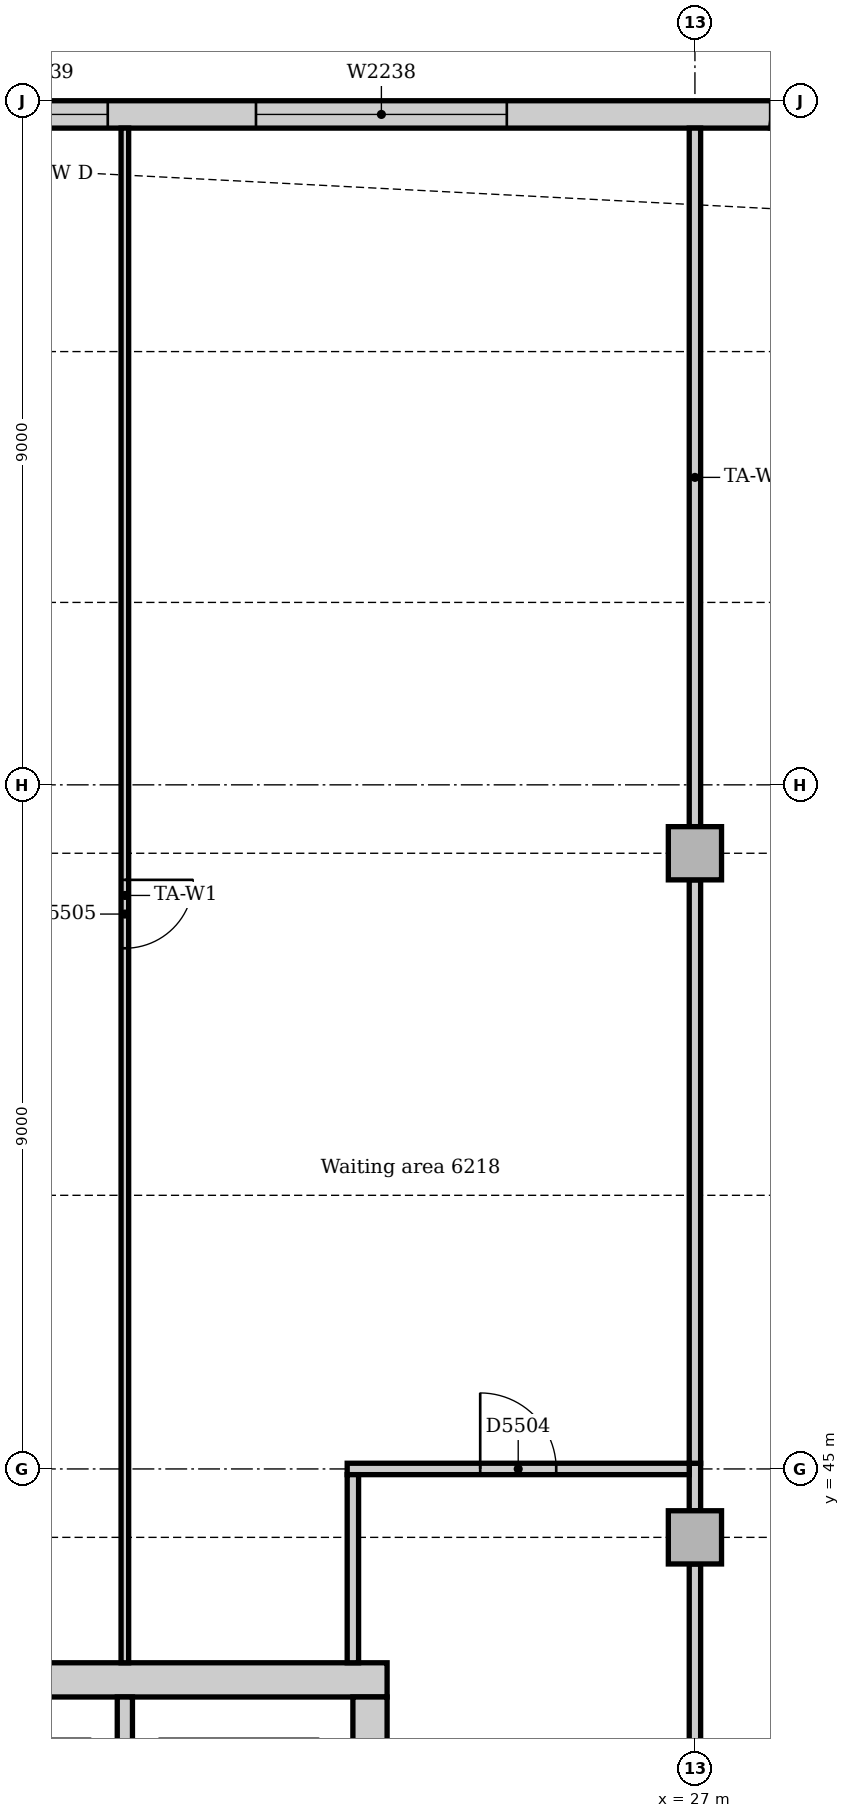
"""IFC4 building model, lengths in metres.
Left out: names, types, materials, properties, quantities, classifications, styles, units other than length and angle.
Written with IfcOpenShell. Run it as: python <this file> out.ifc"""

import sys

from ifc_helpers import new_model, si_unit, direction, frame, frame_2d, origin, origin_2d, place, context, subcontext, project, spatial, rectangle, extrude, element, fill, save


model = new_model("IFC4")
c1 = context("Model", 3, precision=1e-05, world=origin(), true_north=direction((0.0, 1.0)))
c2 = subcontext(c1, "Body", "Model", "MODEL_VIEW")
j1 = project(units=[si_unit("LENGTHUNIT", "METRE"), si_unit("PLANEANGLEUNIT", "RADIAN")], contexts=[c1])
p1 = place(None, origin())
s1 = spatial("IfcSite", under=j1, at=p1, CompositionType="ELEMENT")
p2 = place(p1, origin())
s2 = spatial("IfcBuilding", under=s1, at=p2, CompositionType="ELEMENT")
p3 = place(p2, frame((0.0, 0.0, 259.0)))
s3 = spatial("IfcBuildingStorey", under=s2, at=p3, CompositionType="ELEMENT", Elevation=259.0)
p4 = place(p3, frame((22.95, 42.225, 0.0), z_axis=(0.0, 0.0, 1.0), x_axis=(-1.0, 0.0, 0.0)))
e1 = element("IfcWall", 1, at=p4, inside=s3, PredefinedType="SOLIDWALL", context=c2, shape_type="SweptSolid", body=[
    extrude(rectangle(XDim=18.9, YDim=0.45, at=frame_2d((9.45, 0.0))), origin(), (0.0, 0.0, 1.0), 4.0),
])
p5 = place(p3, frame((22.725, 31.5, 0.0), z_axis=(0.0, 0.0, 1.0), x_axis=(0.0, 1.0, 0.0)))
e2 = element("IfcWall", 2, at=p5, inside=s3, PredefinedType="SOLIDWALL", context=c2, shape_type="SweptSolid", body=[
    extrude(rectangle(XDim=10.5, YDim=0.45, at=frame_2d((5.25, 0.0))), origin(), (0.0, 0.0, 1.0), 4.0),
])
p6 = place(p5, frame((3.15, 0.0, 0.0)))
e3 = element("IfcOpeningElement", 3, at=p6, cuts=e2, PredefinedType="OPENING", context=c2, shape_type="SweptSolid", body=[
    extrude(rectangle(XDim=1.0, YDim=2.1, at=frame_2d((0.5, 1.05))), frame((0.0, 0.235, 0.0), z_axis=(0.0, -1.0, 0.0), x_axis=(1.0, 0.0, 0.0)), (0.0, 0.0, 1.0), 0.47),
])
p7 = place(p5, frame((5.2, 0.0, 0.0)))
e4 = element("IfcOpeningElement", 4, at=p7, cuts=e2, PredefinedType="OPENING", context=c2, shape_type="SweptSolid", body=[
    extrude(rectangle(XDim=1.0, YDim=2.1, at=frame_2d((0.5, 1.05))), frame((0.0, 0.235, 0.0), z_axis=(0.0, -1.0, 0.0), x_axis=(1.0, 0.0, 0.0)), (0.0, 0.0, 1.0), 0.47),
])
for number, where, z_axis, x_axis in (
    (5, (27.0, 44.1, 0.0), (0.0, 0.0, 1.0), (1.0, 0.0, 0.0)),
    (6, (27.0, 53.1, 0.0), (0.0, 0.0, 1.0), (1.0, 0.0, 0.0)),
):
    element("IfcColumn", number, at=place(p3, frame(where, z_axis=z_axis, x_axis=x_axis)), inside=s3, PredefinedType="COLUMN", context=c2, shape_type="SweptSolid", body=[
        extrude(rectangle(XDim=0.7, YDim=0.7, at=origin_2d()), origin(), (0.0, 0.0, 1.0), 3.85),
    ])
p8 = place(p3, frame((28.007, 62.82, 0.0), z_axis=(0.0, 0.0, 1.0), x_axis=(-1.0, 0.0, 0.0)))
e7 = element("IfcWall", 7, at=p8, inside=s3, PredefinedType="STANDARD", context=c2, shape_type="SweptSolid", body=[
    extrude(rectangle(XDim=23.765, YDim=0.36, at=frame_2d((11.882, 0.0))), origin(), (0.0, 0.0, 1.0), 3.85),
])
p9 = place(p8, frame((3.482, 0.0, 0.9)))
e8 = element("IfcOpeningElement", 8, at=p9, cuts=e7, PredefinedType="OPENING", context=c2, shape_type="SweptSolid", body=[
    extrude(rectangle(XDim=3.3, YDim=1.6, at=frame_2d((1.65, 0.8))), frame((0.0, 0.19, 0.0), z_axis=(0.0, -1.0, 0.0), x_axis=(1.0, 0.0, 0.0)), (0.0, 0.0, 1.0), 0.38),
])
p10 = place(p8, frame((8.732, 0.0, 0.9)))
e9 = element("IfcOpeningElement", 9, at=p10, cuts=e7, PredefinedType="OPENING", context=c2, shape_type="SweptSolid", body=[
    extrude(rectangle(XDim=1.8, YDim=1.6, at=frame_2d((0.9, 0.8))), frame((0.0, 0.19, 0.0), z_axis=(0.0, -1.0, 0.0), x_axis=(1.0, 0.0, 0.0)), (0.0, 0.0, 1.0), 0.38),
])
p11 = place(p8, frame((12.482, 0.0, 0.9)))
e10 = element("IfcOpeningElement", 10, at=p11, cuts=e7, PredefinedType="OPENING", context=c2, shape_type="SweptSolid", body=[
    extrude(rectangle(XDim=3.3, YDim=1.6, at=frame_2d((1.65, 0.8))), frame((0.0, 0.19, 0.0), z_axis=(0.0, -1.0, 0.0), x_axis=(1.0, 0.0, 0.0)), (0.0, 0.0, 1.0), 0.38),
])
p12 = place(p8, frame((16.982, 0.0, 0.9)))
e11 = element("IfcOpeningElement", 11, at=p12, cuts=e7, PredefinedType="OPENING", context=c2, shape_type="SweptSolid", body=[
    extrude(rectangle(XDim=3.3, YDim=1.6, at=frame_2d((1.65, 0.8))), frame((0.0, 0.19, 0.0), z_axis=(0.0, -1.0, 0.0), x_axis=(1.0, 0.0, 0.0)), (0.0, 0.0, 1.0), 0.38),
])
p13 = place(p3, frame((28.726, 62.724, 0.0), z_axis=(0.0, 0.0, 1.0), x_axis=(-0.99144092581, 0.13055608231, 0.0)))
e12 = element("IfcWall", 12, at=p13, inside=s3, PredefinedType="STANDARD", context=c2, shape_type="SweptSolid", body=[
    extrude(rectangle(XDim=0.713, YDim=0.36, at=frame_2d((0.356, 0.0))), origin(), (0.0, 0.0, 1.0), 3.85),
])
p14 = place(p3, frame((19.5, 38.6, 0.0), z_axis=(0.0, 0.0, 1.0), x_axis=(0.0, 1.0, 0.0)))
e13 = element("IfcWall", 13, at=p14, inside=s3, PredefinedType="PARTITIONING", context=c2, shape_type="SweptSolid", body=[
    extrude(rectangle(XDim=3.4, YDim=0.2, at=frame_2d((1.7, 0.0))), origin(), (0.0, 0.0, 1.0), 3.85),
])
p15 = place(p3, frame((27.0, 36.35, 0.0), z_axis=(0.0, 0.0, 1.0), x_axis=(0.0, 1.0, 0.0)))
e14 = element("IfcWall", 14, at=p15, inside=s3, PredefinedType="PARTITIONING", context=c2, shape_type="SweptSolid", body=[
    extrude(rectangle(XDim=7.4, YDim=0.15, at=frame_2d((3.7, 0.0))), origin(), (0.0, 0.0, 1.0), 3.4),
])
p16 = place(p3, frame((27.0, 44.45, 0.0), z_axis=(0.0, 0.0, 1.0), x_axis=(0.0, 1.0, 0.0)))
e15 = element("IfcWall", 15, at=p16, inside=s3, PredefinedType="PARTITIONING", context=c2, shape_type="SweptSolid", body=[
    extrude(rectangle(XDim=0.625, YDim=0.15, at=frame_2d((0.312, 0.0))), origin(), (0.0, 0.0, 1.0), 3.4),
])
p17 = place(p3, frame((22.425, 45.0, 0.0), z_axis=(0.0, 0.0, 1.0), x_axis=(1.0, 0.0, 0.0)))
e16 = element("IfcWall", 16, at=p17, inside=s3, PredefinedType="PARTITIONING", context=c2, shape_type="SweptSolid", body=[
    extrude(rectangle(XDim=4.5, YDim=0.15, at=frame_2d((2.25, 0.0))), origin(), (0.0, 0.0, 1.0), 3.85),
])
p18 = place(p17, frame((1.75, 0.0, 0.0)))
e17 = element("IfcOpeningElement", 17, at=p18, cuts=e16, PredefinedType="OPENING", context=c2, shape_type="SweptSolid", body=[
    extrude(rectangle(XDim=1.0, YDim=2.1, at=frame_2d((0.5, 1.05))), frame((0.0, 0.085, 0.0), z_axis=(0.0, -1.0, 0.0), x_axis=(1.0, 0.0, 0.0)), (0.0, 0.0, 1.0), 0.17),
])
p19 = place(p3, frame((22.5, 42.45, 0.0), z_axis=(0.0, 0.0, 1.0), x_axis=(0.0, 1.0, 0.0)))
e18 = element("IfcWall", 18, at=p19, inside=s3, PredefinedType="PARTITIONING", context=c2, shape_type="SweptSolid", body=[
    extrude(rectangle(XDim=2.475, YDim=0.15, at=frame_2d((1.238, 0.0))), origin(), (0.0, 0.0, 1.0), 3.85),
])
p20 = place(p3, frame((27.0, 53.45, 0.0), z_axis=(0.0, 0.0, 1.0), x_axis=(0.0, 1.0, 0.0)))
e19 = element("IfcWall", 19, at=p20, inside=s3, PredefinedType="PARTITIONING", context=c2, shape_type="SweptSolid", body=[
    extrude(rectangle(XDim=9.19, YDim=0.15, at=frame_2d((4.595, 0.0))), origin(), (0.0, 0.0, 1.0), 3.4),
])
p21 = place(p3, frame((27.0, 45.075, 0.0), z_axis=(0.0, 0.0, 1.0), x_axis=(0.0, 1.0, 0.0)))
e20 = element("IfcWall", 20, at=p21, inside=s3, PredefinedType="PARTITIONING", context=c2, shape_type="SweptSolid", body=[
    extrude(rectangle(XDim=7.675, YDim=0.15, at=frame_2d((3.837, 0.0))), origin(), (0.0, 0.0, 1.0), 3.4),
])
p22 = place(p3, frame((19.5, 42.45, 0.0), z_axis=(0.0, 0.0, 1.0), x_axis=(0.0, 1.0, 0.0)))
e21 = element("IfcWall", 21, at=p22, inside=s3, PredefinedType="PARTITIONING", context=c2, shape_type="SweptSolid", body=[
    extrude(rectangle(XDim=20.19, YDim=0.1, at=frame_2d((10.095, 0.0))), origin(), (0.0, 0.0, 1.0), 3.85),
])
p23 = place(p22, frame((9.4, 0.0, 0.0)))
e22 = element("IfcOpeningElement", 22, at=p23, cuts=e21, PredefinedType="OPENING", context=c2, shape_type="SweptSolid", body=[
    extrude(rectangle(XDim=0.9, YDim=2.1, at=frame_2d((0.45, 1.05))), frame((0.0, 0.06, 0.0), z_axis=(0.0, -1.0, 0.0), x_axis=(1.0, 0.0, 0.0)), (0.0, 0.0, 1.0), 0.12),
])
p24 = place(p9, origin())
e23 = element("IfcWindow", 23, at=p24, inside=s3, PartitioningType="SINGLE_PANEL", PredefinedType="WINDOW", context=c2, shape_type="SweptSolid", body=[
    extrude(rectangle(XDim=3.3, YDim=1.6, at=frame_2d((1.65, 0.8))), frame((0.0, 0.13, 0.0), z_axis=(0.0, -1.0, 0.0), x_axis=(1.0, 0.0, 0.0)), (0.0, 0.0, 1.0), 0.06),
])
fill(e8, e23)
p25 = place(p10, origin())
e24 = element("IfcWindow", 24, at=p25, inside=s3, PartitioningType="SINGLE_PANEL", PredefinedType="WINDOW", context=c2, shape_type="SweptSolid", body=[
    extrude(rectangle(XDim=1.8, YDim=1.6, at=frame_2d((0.9, 0.8))), frame((0.0, 0.13, 0.0), z_axis=(0.0, -1.0, 0.0), x_axis=(1.0, 0.0, 0.0)), (0.0, 0.0, 1.0), 0.06),
])
fill(e9, e24)
p26 = place(p18, origin())
e25 = element("IfcDoor", 25, at=p26, inside=s3, OperationType="SINGLE_SWING_LEFT", PredefinedType="DOOR", context=c2, shape_type="SweptSolid", body=[
    extrude(rectangle(XDim=1.0, YDim=2.1, at=frame_2d((0.5, 1.05))), frame((0.0, 0.025, 0.0), z_axis=(0.0, -1.0, 0.0), x_axis=(1.0, 0.0, 0.0)), (0.0, 0.0, 1.0), 0.05),
])
fill(e17, e25)
p27 = place(p23, frame((0.9, 0.0, 0.0), z_axis=(0.0, 0.0, 1.0), x_axis=(-1.0, 0.0, 0.0)))
e26 = element("IfcDoor", 26, at=p27, inside=s3, OperationType="SINGLE_SWING_LEFT", PredefinedType="DOOR", context=c2, shape_type="SweptSolid", body=[
    extrude(rectangle(XDim=0.9, YDim=2.1, at=frame_2d((0.45, 1.05))), frame((0.0, 0.025, 0.0), z_axis=(0.0, -1.0, 0.0), x_axis=(1.0, 0.0, 0.0)), (0.0, 0.0, 1.0), 0.05),
])
fill(e22, e26)
save(model, sys.argv[1])
